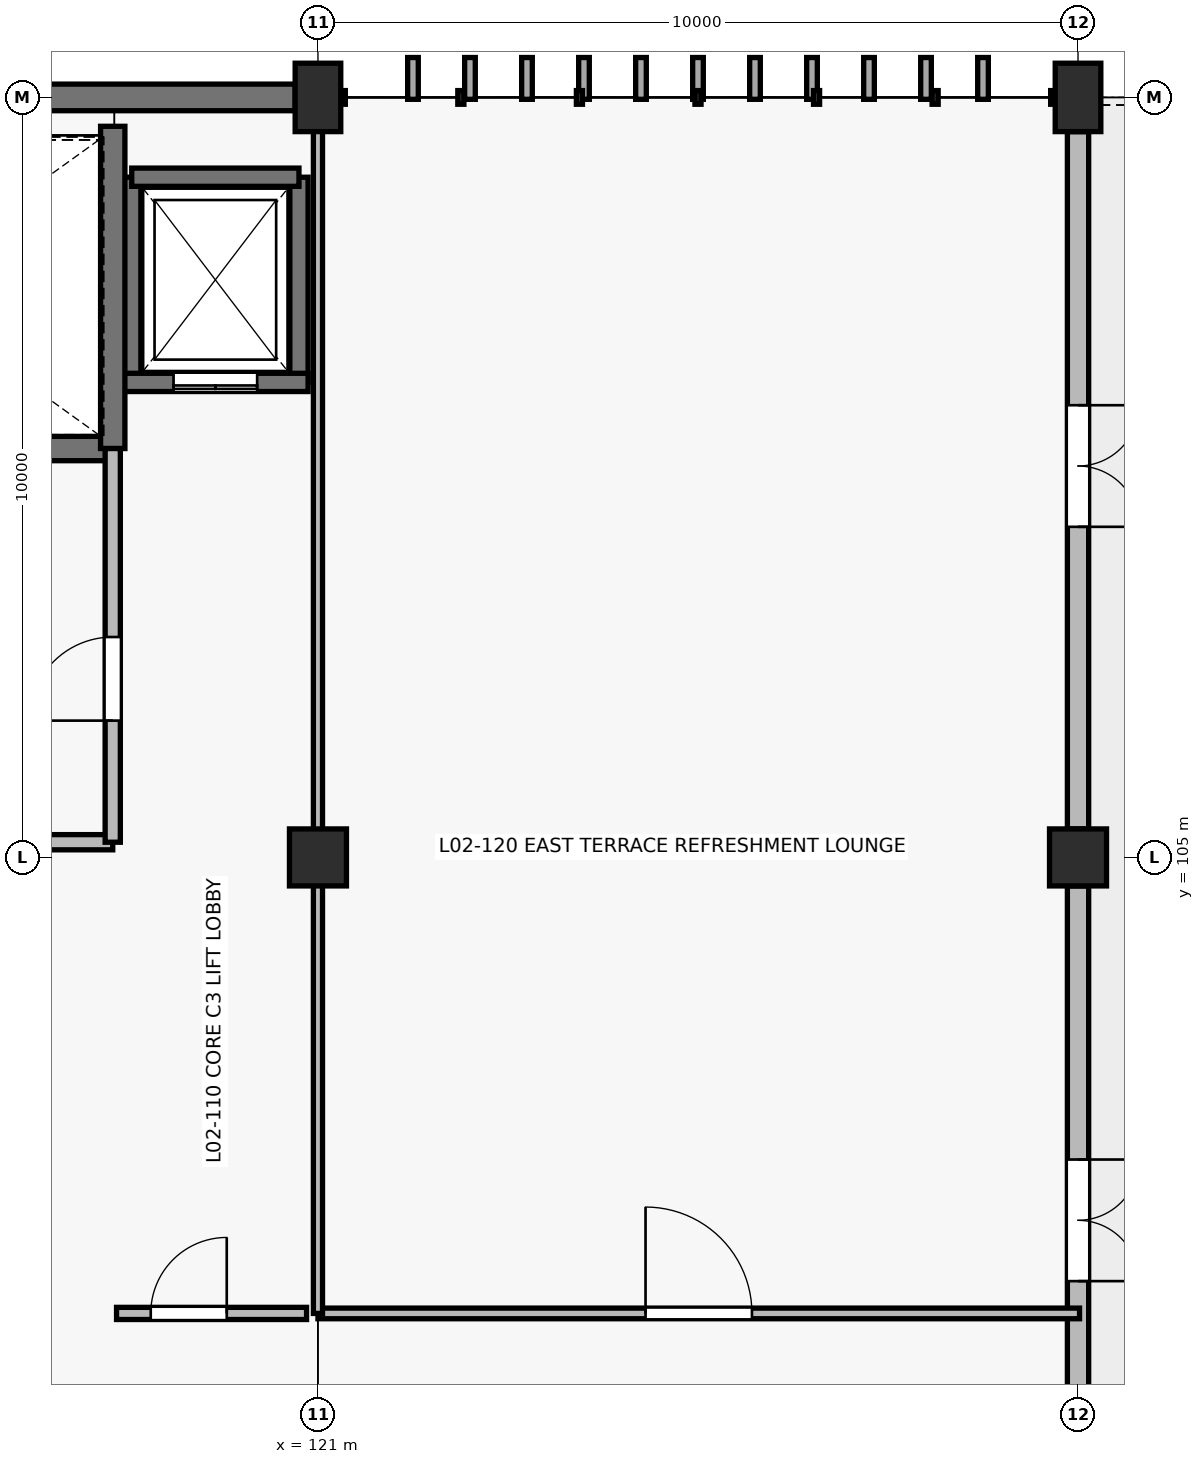
"""IFC4 building model, lengths in metres.
Left out: names, types, materials, properties, quantities, classifications, styles, units other than length and angle.
Written with IfcOpenShell. Run it as: python <this file> out.ifc"""

import sys

from ifc_helpers import new_model, si_unit, direction, frame, frame_2d, origin, origin_2d, place, context, subcontext, project, spatial, rectangle, extrude, element, fill, save


model = new_model("IFC4")
c1 = context("Model", 3, precision=1e-05, world=origin(), true_north=direction((0.0, 1.0)))
c2 = subcontext(c1, "Body", "Model", "MODEL_VIEW")
j1 = project(units=[si_unit("LENGTHUNIT", "METRE"), si_unit("PLANEANGLEUNIT", "RADIAN")], contexts=[c1])
p1 = place(None, origin())
s1 = spatial("IfcSite", under=j1, at=p1, CompositionType="ELEMENT")
p2 = place(p1, origin())
s2 = spatial("IfcBuilding", under=s1, at=p2, CompositionType="ELEMENT")
p3 = place(p2, frame((0.0, 0.0, 9.0)))
s3 = spatial("IfcBuildingStorey", under=s2, at=p3, CompositionType="ELEMENT", Elevation=9.0)
p4 = place(p3, frame((121.0, 105.0, 0.0), z_axis=(0.0, 0.0, 1.0), x_axis=(1.0, 0.0, 0.0)))
e1 = element("IfcColumn", 1, at=p4, inside=s3, PredefinedType="COLUMN", context=c2, shape_type="SweptSolid", body=[
    extrude(rectangle(XDim=0.75, YDim=0.75, at=origin_2d()), origin(), (0.0, 0.0, 1.0), 4.2),
])
p5 = place(p3, frame((121.0, 115.0, 0.0), z_axis=(0.0, 0.0, 1.0), x_axis=(1.0, 0.0, 0.0)))
e2 = element("IfcColumn", 2, at=p5, inside=s3, PredefinedType="COLUMN", context=c2, shape_type="SweptSolid", body=[
    extrude(rectangle(XDim=0.6, YDim=0.9, at=origin_2d()), origin(), (0.0, 0.0, 1.0), 4.2),
])
p6 = place(p3, frame((131.0, 105.0, 0.0), z_axis=(0.0, 0.0, 1.0), x_axis=(1.0, 0.0, 0.0)))
e3 = element("IfcColumn", 3, at=p6, inside=s3, PredefinedType="COLUMN", context=c2, shape_type="SweptSolid", body=[
    extrude(rectangle(XDim=0.75, YDim=0.75, at=origin_2d()), origin(), (0.0, 0.0, 1.0), 4.2),
])
p7 = place(p3, frame((131.0, 115.0, 0.0), z_axis=(0.0, 0.0, 1.0), x_axis=(1.0, 0.0, 0.0)))
e4 = element("IfcColumn", 4, at=p7, inside=s3, PredefinedType="COLUMN", context=c2, shape_type="SweptSolid", body=[
    extrude(rectangle(XDim=0.6, YDim=0.9, at=origin_2d()), origin(), (0.0, 0.0, 1.0), 4.2),
])
p8 = place(p3, frame((111.3, 115.0, 0.0), z_axis=(0.0, 0.0, 1.0), x_axis=(1.0, 0.0, 0.0)))
e5 = element("IfcWall", 5, at=p8, inside=s3, PredefinedType="SOLIDWALL", context=c2, shape_type="SweptSolid", body=[
    extrude(rectangle(XDim=9.4, YDim=0.35, at=frame_2d((4.7, 0.0))), origin(), (0.0, 0.0, 1.0), 4.2),
])
p9 = place(p8, frame((2.2, 0.0, 1.0)))
e6 = element("IfcOpeningElement", 6, at=p9, cuts=e5, PredefinedType="OPENING", context=c2, shape_type="SweptSolid", body=[
    extrude(rectangle(XDim=1.5, YDim=1.8, at=frame_2d((0.75, 0.9))), frame((0.0, 0.185, 0.0), z_axis=(0.0, -1.0, 0.0), x_axis=(1.0, 0.0, 0.0)), (0.0, 0.0, 1.0), 0.37),
])
p10 = place(p3, frame((131.0, 104.625, 0.0), z_axis=(0.0, 0.0, 1.0), x_axis=(0.0, -1.0, 0.0)))
e7 = element("IfcWall", 7, at=p10, inside=s3, PredefinedType="SOLIDWALL", context=c2, shape_type="SweptSolid", body=[
    extrude(rectangle(XDim=9.475, YDim=0.28, at=frame_2d((4.738, 0.0))), origin(), (0.0, 0.0, 1.0), 2.905),
])
p11 = place(p10, frame((3.6, 0.0, 0.0)))
e8 = element("IfcOpeningElement", 8, at=p11, cuts=e7, PredefinedType="OPENING", context=c2, shape_type="SweptSolid", body=[
    extrude(rectangle(XDim=1.6, YDim=2.2, at=frame_2d((0.8, 1.1))), frame((0.0, 0.15, 0.0), z_axis=(0.0, -1.0, 0.0), x_axis=(1.0, 0.0, 0.0)), (0.0, 0.0, 1.0), 0.3),
])
p12 = place(p3, frame((131.0, 114.55, 0.0), z_axis=(0.0, 0.0, 1.0), x_axis=(0.0, -1.0, 0.0)))
e9 = element("IfcWall", 9, at=p12, inside=s3, PredefinedType="SOLIDWALL", context=c2, shape_type="SweptSolid", body=[
    extrude(rectangle(XDim=9.175, YDim=0.28, at=frame_2d((4.587, 0.0))), origin(), (0.0, 0.0, 1.0), 2.905),
])
p13 = place(p12, frame((3.6, 0.0, 0.0)))
e10 = element("IfcOpeningElement", 10, at=p13, cuts=e9, PredefinedType="OPENING", context=c2, shape_type="SweptSolid", body=[
    extrude(rectangle(XDim=1.6, YDim=2.2, at=frame_2d((0.8, 1.1))), frame((0.0, 0.15, 0.0), z_axis=(0.0, -1.0, 0.0), x_axis=(1.0, 0.0, 0.0)), (0.0, 0.0, 1.0), 0.3),
])
for number, where, z_axis, x_axis in (
    (11, (118.55, 111.25, 0.0), (0.0, 0.0, 1.0), (0.0, 1.0, 0.0)),
    (12, (120.75, 113.95, 0.0), (0.0, 0.0, 1.0), (0.0, -1.0, 0.0)),
):
    element("IfcWall", number, at=place(p3, frame(where, z_axis=z_axis, x_axis=x_axis)), inside=s3, PredefinedType="SHEAR", context=c2, shape_type="SweptSolid", body=[
        extrude(rectangle(XDim=2.7, YDim=0.24, at=frame_2d((1.35, 0.0))), origin(), (0.0, 0.0, 1.0), 4.2),
    ])
p14 = place(p3, frame((118.55, 113.95, 0.0), z_axis=(0.0, 0.0, 1.0), x_axis=(1.0, 0.0, 0.0)))
e13 = element("IfcWall", 13, at=p14, inside=s3, PredefinedType="SHEAR", context=c2, shape_type="SweptSolid", body=[
    extrude(rectangle(XDim=2.2, YDim=0.24, at=frame_2d((1.1, 0.0))), origin(), (0.0, 0.0, 1.0), 4.2),
])
p15 = place(p3, frame((120.87, 111.25, 0.0), z_axis=(0.0, 0.0, 1.0), x_axis=(-1.0, 0.0, 0.0)))
e14 = element("IfcWall", 14, at=p15, inside=s3, PredefinedType="SHEAR", context=c2, shape_type="SweptSolid", body=[
    extrude(rectangle(XDim=2.44, YDim=0.24, at=frame_2d((1.22, 0.0))), origin(), (0.0, 0.0, 1.0), 4.2),
])
p16 = place(p15, frame((0.67, 0.0, 0.0)))
e15 = element("IfcOpeningElement", 15, at=p16, cuts=e14, PredefinedType="OPENING", context=c2, shape_type="SweptSolid", body=[
    extrude(rectangle(XDim=1.1, YDim=2.15, at=frame_2d((0.55, 1.075))), frame((0.0, 0.13, 0.0), z_axis=(0.0, -1.0, 0.0), x_axis=(1.0, 0.0, 0.0)), (0.0, 0.0, 1.0), 0.26),
])
p17 = place(p3, frame((111.2, 110.38, 0.0), z_axis=(0.0, 0.0, 1.0), x_axis=(1.0, 0.0, 0.0)))
e16 = element("IfcWall", 16, at=p17, inside=s3, PredefinedType="SHEAR", context=c2, shape_type="SweptSolid", body=[
    extrude(rectangle(XDim=7.1, YDim=0.32, at=frame_2d((3.55, 0.0))), origin(), (0.0, 0.0, 1.0), 4.2),
])
p18 = place(p17, frame((0.3, 0.0, 0.0)))
e17 = element("IfcOpeningElement", 17, at=p18, cuts=e16, PredefinedType="OPENING", context=c2, shape_type="SweptSolid", body=[
    extrude(rectangle(XDim=1.0, YDim=2.15, at=frame_2d((0.5, 1.075))), frame((0.0, 0.17, 0.0), z_axis=(0.0, -1.0, 0.0), x_axis=(1.0, 0.0, 0.0)), (0.0, 0.0, 1.0), 0.34),
])
p19 = place(p3, frame((118.3, 110.38, 0.0), z_axis=(0.0, 0.0, 1.0), x_axis=(0.0, 1.0, 0.0)))
e18 = element("IfcWall", 18, at=p19, inside=s3, PredefinedType="SHEAR", context=c2, shape_type="SweptSolid", body=[
    extrude(rectangle(XDim=4.24, YDim=0.32, at=frame_2d((2.12, 0.0))), origin(), (0.0, 0.0, 1.0), 4.2),
])
p20 = place(p3, frame((111.2, 105.2, 0.0), z_axis=(0.0, 0.0, 1.0), x_axis=(1.0, 0.0, 0.0)))
e19 = element("IfcWall", 19, at=p20, inside=s3, PredefinedType="PARTITIONING", context=c2, shape_type="SweptSolid", body=[
    extrude(rectangle(XDim=7.1, YDim=0.2, at=frame_2d((3.55, 0.0))), origin(), (0.0, 0.0, 1.0), 2.905),
])
p21 = place(p20, frame((2.2, 0.0, 0.0)))
e20 = element("IfcOpeningElement", 20, at=p21, cuts=e19, PredefinedType="OPENING", context=c2, shape_type="SweptSolid", body=[
    extrude(rectangle(XDim=1.6, YDim=2.2, at=frame_2d((0.8, 1.1))), frame((0.0, 0.11, 0.0), z_axis=(0.0, -1.0, 0.0), x_axis=(1.0, 0.0, 0.0)), (0.0, 0.0, 1.0), 0.22),
])
p22 = place(p3, frame((118.3, 105.2, 0.0), z_axis=(0.0, 0.0, 1.0), x_axis=(0.0, 1.0, 0.0)))
e21 = element("IfcWall", 21, at=p22, inside=s3, PredefinedType="PARTITIONING", context=c2, shape_type="SweptSolid", body=[
    extrude(rectangle(XDim=5.18, YDim=0.2, at=frame_2d((2.59, 0.0))), origin(), (0.0, 0.0, 1.0), 3.005),
])
p23 = place(p22, frame((1.6, 0.0, 0.0)))
e22 = element("IfcOpeningElement", 22, at=p23, cuts=e21, PredefinedType="OPENING", context=c2, shape_type="SweptSolid", body=[
    extrude(rectangle(XDim=1.1, YDim=2.15, at=frame_2d((0.55, 1.075))), frame((0.0, 0.11, 0.0), z_axis=(0.0, -1.0, 0.0), x_axis=(1.0, 0.0, 0.0)), (0.0, 0.0, 1.0), 0.22),
])
p24 = place(p3, frame((118.35, 99.0, 0.0), z_axis=(0.0, 0.0, 1.0), x_axis=(1.0, 0.0, 0.0)))
e23 = element("IfcWall", 23, at=p24, inside=s3, PredefinedType="PARTITIONING", context=c2, shape_type="SweptSolid", body=[
    extrude(rectangle(XDim=2.5, YDim=0.16, at=frame_2d((1.25, 0.0))), origin(), (0.0, 0.0, 1.0), 2.905),
])
p25 = place(p24, frame((0.45, 0.0, 0.0)))
e24 = element("IfcOpeningElement", 24, at=p25, cuts=e23, PredefinedType="OPENING", context=c2, shape_type="SweptSolid", body=[
    extrude(rectangle(XDim=1.0, YDim=2.15, at=frame_2d((0.5, 1.075))), frame((0.0, 0.09, 0.0), z_axis=(0.0, -1.0, 0.0), x_axis=(1.0, 0.0, 0.0)), (0.0, 0.0, 1.0), 0.18),
])
p26 = place(p3, frame((121.0, 99.0, 0.0), z_axis=(0.0, 0.0, 1.0), x_axis=(1.0, 0.0, 0.0)))
e25 = element("IfcWall", 25, at=p26, inside=s3, PredefinedType="PARTITIONING", context=c2, shape_type="SweptSolid", body=[
    extrude(rectangle(XDim=10.02, YDim=0.14, at=frame_2d((5.01, 0.0))), origin(), (0.0, 0.0, 1.0), 2.905),
])
p27 = place(p26, frame((4.31, 0.0, 0.0)))
e26 = element("IfcOpeningElement", 26, at=p27, cuts=e25, PredefinedType="OPENING", context=c2, shape_type="SweptSolid", body=[
    extrude(rectangle(XDim=1.4, YDim=2.2, at=frame_2d((0.7, 1.1))), frame((0.0, 0.08, 0.0), z_axis=(0.0, -1.0, 0.0), x_axis=(1.0, 0.0, 0.0)), (0.0, 0.0, 1.0), 0.16),
])
p28 = place(p3, frame((121.0, 99.0, 0.0), z_axis=(0.0, 0.0, 1.0), x_axis=(0.0, 1.0, 0.0)))
e27 = element("IfcWall", 27, at=p28, inside=s3, PredefinedType="PARTITIONING", context=c2, shape_type="SweptSolid", body=[
    extrude(rectangle(XDim=15.75, YDim=0.12, at=frame_2d((7.875, 0.0))), origin(), (0.0, 0.0, 1.0), 2.905),
])
p29 = place(p11, origin())
e28 = element("IfcDoor", 28, at=p29, inside=s3, OperationType="DOUBLE_DOOR_SINGLE_SWING", PredefinedType="DOOR", context=c2, shape_type="SweptSolid", body=[
    extrude(rectangle(XDim=1.6, YDim=2.2, at=frame_2d((0.8, 1.1))), frame((0.0, 0.025, 0.0), z_axis=(0.0, -1.0, 0.0), x_axis=(1.0, 0.0, 0.0)), (0.0, 0.0, 1.0), 0.05),
])
fill(e8, e28)
p30 = place(p13, origin())
e29 = element("IfcDoor", 29, at=p30, inside=s3, OperationType="DOUBLE_DOOR_SINGLE_SWING", PredefinedType="DOOR", context=c2, shape_type="SweptSolid", body=[
    extrude(rectangle(XDim=1.6, YDim=2.2, at=frame_2d((0.8, 1.1))), frame((0.0, 0.025, 0.0), z_axis=(0.0, -1.0, 0.0), x_axis=(1.0, 0.0, 0.0)), (0.0, 0.0, 1.0), 0.05),
])
fill(e10, e29)
p31 = place(p16, origin())
e30 = element("IfcDoor", 30, at=p31, inside=s3, OperationType="DOUBLE_DOOR_SLIDING", PredefinedType="USERDEFINED", context=c2, shape_type="SweptSolid", body=[
    extrude(rectangle(XDim=1.1, YDim=2.15, at=frame_2d((0.55, 1.075))), frame((0.0, 0.025, 0.0), z_axis=(0.0, -1.0, 0.0), x_axis=(1.0, 0.0, 0.0)), (0.0, 0.0, 1.0), 0.05),
])
fill(e15, e30)
p32 = place(p23, origin())
e31 = element("IfcDoor", 31, at=p32, inside=s3, OperationType="SINGLE_SWING_LEFT", PredefinedType="DOOR", context=c2, shape_type="SweptSolid", body=[
    extrude(rectangle(XDim=1.1, YDim=2.15, at=frame_2d((0.55, 1.075))), frame((0.0, 0.025, 0.0), z_axis=(0.0, -1.0, 0.0), x_axis=(1.0, 0.0, 0.0)), (0.0, 0.0, 1.0), 0.05),
])
fill(e22, e31)
p33 = place(p25, origin())
e32 = element("IfcDoor", 32, at=p33, inside=s3, OperationType="SINGLE_SWING_RIGHT", PredefinedType="DOOR", context=c2, shape_type="SweptSolid", body=[
    extrude(rectangle(XDim=1.0, YDim=2.15, at=frame_2d((0.5, 1.075))), frame((0.0, 0.025, 0.0), z_axis=(0.0, -1.0, 0.0), x_axis=(1.0, 0.0, 0.0)), (0.0, 0.0, 1.0), 0.05),
])
fill(e24, e32)
p34 = place(p27, origin())
e33 = element("IfcDoor", 33, at=p34, inside=s3, OperationType="SINGLE_SWING_LEFT", PredefinedType="DOOR", context=c2, shape_type="SweptSolid", body=[
    extrude(rectangle(XDim=1.4, YDim=2.2, at=frame_2d((0.7, 1.1))), frame((0.0, 0.025, 0.0), z_axis=(0.0, -1.0, 0.0), x_axis=(1.0, 0.0, 0.0)), (0.0, 0.0, 1.0), 0.05),
])
fill(e26, e33)
save(model, sys.argv[1])
